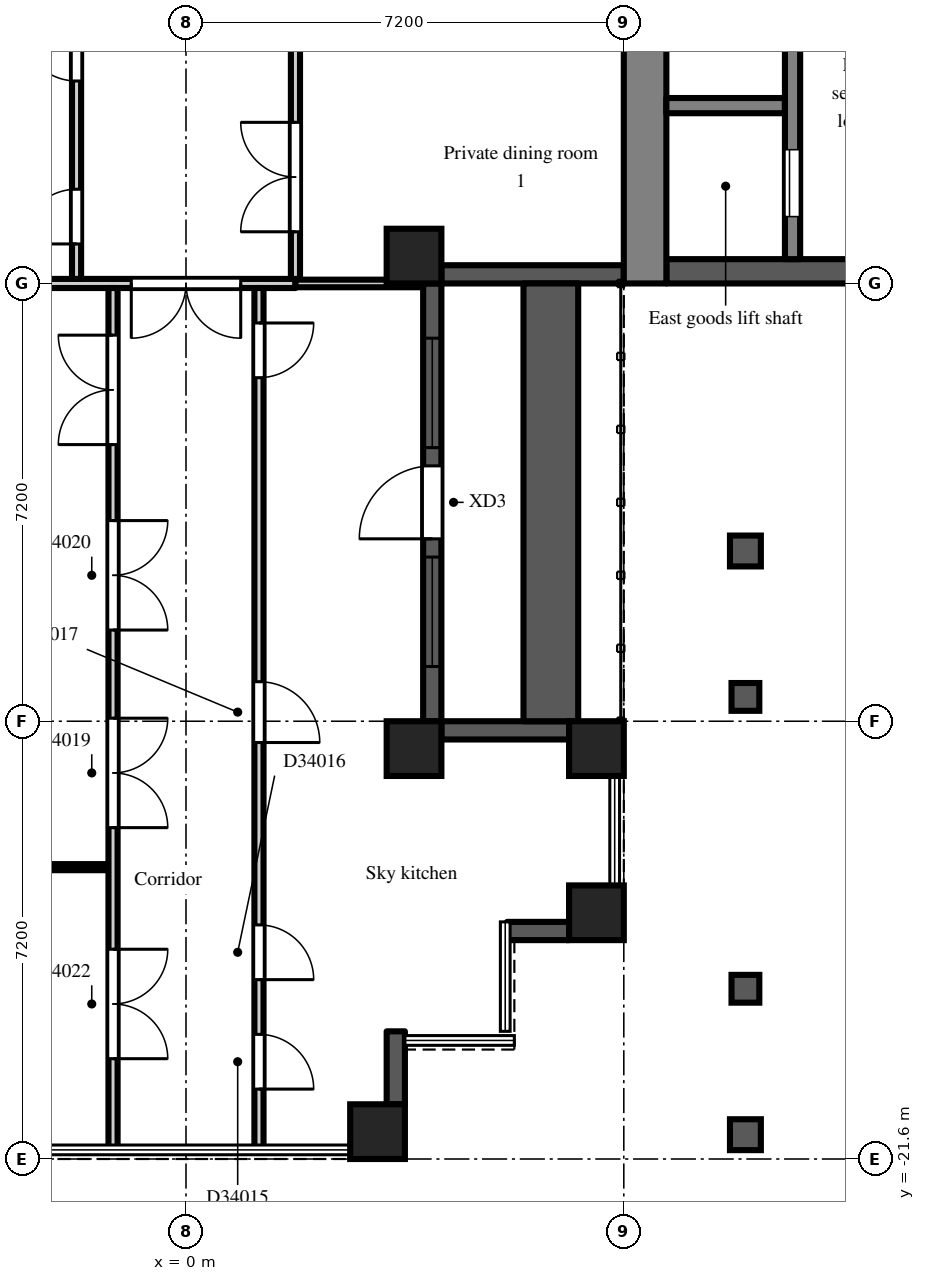
"""IFC4 building model, lengths in metres.
Left out: names, types, materials, properties, quantities, classifications, styles, units other than length and angle.
Written with IfcOpenShell. Run it as: python <this file> out.ifc"""

import sys

from ifc_helpers import new_model, si_unit, direction, frame, frame_2d, origin, origin_2d, place, context, subcontext, project, spatial, rectangle, extrude, element, fill, save


model = new_model("IFC4")
c1 = context("Model", 3, precision=1e-05, world=origin(), true_north=direction((0.0, 1.0)))
c2 = subcontext(c1, "Body", "Model", "MODEL_VIEW")
j1 = project(units=[si_unit("LENGTHUNIT", "METRE"), si_unit("PLANEANGLEUNIT", "RADIAN")], contexts=[c1])
p1 = place(None, origin())
s1 = spatial("IfcSite", under=j1, at=p1, CompositionType="ELEMENT")
p2 = place(p1, origin())
s2 = spatial("IfcBuilding", under=s1, at=p2, CompositionType="ELEMENT")
p3 = place(p2, frame((0.0, 0.0, 237.9)))
s3 = spatial("IfcBuildingStorey", under=s2, at=p3, CompositionType="ELEMENT", Elevation=237.9)
for number, where, z_axis, x_axis in (
    (1, (3.15, -21.15, 0.0), (0.0, 0.0, 1.0), (1.0, 0.0, 0.0)),
    (2, (3.75, -14.85, 0.0), (0.0, 0.0, 1.0), (1.0, 0.0, 0.0)),
    (3, (3.75, -6.75, 0.0), (0.0, 0.0, 1.0), (1.0, 0.0, 0.0)),
    (4, (6.75, -17.55, 0.0), (0.0, 0.0, 1.0), (1.0, 0.0, 0.0)),
    (5, (6.75, -14.85, 0.0), (0.0, 0.0, 1.0), (1.0, 0.0, 0.0)),
):
    element("IfcColumn", number, at=place(p3, frame(where, z_axis=z_axis, x_axis=x_axis)), inside=s3, PredefinedType="COLUMN", context=c2, shape_type="SweptSolid", body=[
        extrude(rectangle(XDim=0.9, YDim=0.9, at=origin_2d()), origin(), (0.0, 0.0, 1.0), 4.2),
    ])
p4 = place(p3, frame((3.45, -20.7, 0.0), z_axis=(0.0, 0.0, 1.0), x_axis=(0.0, 1.0, 0.0)))
e6 = element("IfcWall", 6, at=p4, inside=s3, PredefinedType="SOLIDWALL", context=c2, shape_type="SweptSolid", body=[
    extrude(rectangle(XDim=1.2, YDim=0.3, at=frame_2d((0.6, 0.0))), origin(), (0.0, 0.0, 1.0), 3.75),
])
p5 = place(p3, frame((5.28, -17.85, 0.0), z_axis=(0.0, 0.0, 1.0), x_axis=(1.0, 0.0, 0.0)))
e7 = element("IfcWall", 7, at=p5, inside=s3, PredefinedType="SOLIDWALL", context=c2, shape_type="SweptSolid", body=[
    extrude(rectangle(XDim=1.02, YDim=0.3, at=frame_2d((0.51, 0.0))), origin(), (0.0, 0.0, 1.0), 3.75),
])
p6 = place(p3, frame((6.3, -14.55, 0.0), z_axis=(0.0, 0.0, 1.0), x_axis=(-1.0, 0.0, 0.0)))
e8 = element("IfcWall", 8, at=p6, inside=s3, PredefinedType="SOLIDWALL", context=c2, shape_type="SweptSolid", body=[
    extrude(rectangle(XDim=2.1, YDim=0.3, at=frame_2d((1.05, 0.0))), origin(), (0.0, 0.0, 1.0), 3.75),
])
p7 = place(p3, frame((4.05, -14.4, 0.0), z_axis=(0.0, 0.0, 1.0), x_axis=(0.0, 1.0, 0.0)))
e9 = element("IfcWall", 9, at=p7, inside=s3, PredefinedType="SOLIDWALL", context=c2, shape_type="SweptSolid", body=[
    extrude(rectangle(XDim=7.2, YDim=0.3, at=frame_2d((3.6, 0.0))), origin(), (0.0, 0.0, 1.0), 3.75),
])
p8 = place(p7, frame((3.0, 0.0, 0.0)))
e10 = element("IfcOpeningElement", 10, at=p8, cuts=e9, PredefinedType="OPENING", context=c2, shape_type="SweptSolid", body=[
    extrude(rectangle(XDim=1.2, YDim=2.05, at=frame_2d((0.6, 1.025))), frame((0.0, 0.16, 0.0), z_axis=(0.0, -1.0, 0.0), x_axis=(1.0, 0.0, 0.0)), (0.0, 0.0, 1.0), 0.32),
])
p9 = place(p7, frame((0.9, 0.0, 0.2)))
e11 = element("IfcOpeningElement", 11, at=p9, cuts=e9, PredefinedType="OPENING", context=c2, shape_type="SweptSolid", body=[
    extrude(rectangle(XDim=1.8, YDim=1.85, at=frame_2d((0.9, 0.925))), frame((0.0, 0.16, 0.0), z_axis=(0.0, -1.0, 0.0), x_axis=(1.0, 0.0, 0.0)), (0.0, 0.0, 1.0), 0.32),
])
p10 = place(p7, frame((4.5, 0.0, 0.2)))
e12 = element("IfcOpeningElement", 12, at=p10, cuts=e9, PredefinedType="OPENING", context=c2, shape_type="SweptSolid", body=[
    extrude(rectangle(XDim=1.8, YDim=1.85, at=frame_2d((0.9, 0.925))), frame((0.0, 0.16, 0.0), z_axis=(0.0, -1.0, 0.0), x_axis=(1.0, 0.0, 0.0)), (0.0, 0.0, 1.0), 0.32),
])
p11 = place(p3, frame((4.2, -7.05, 0.0), z_axis=(0.0, 0.0, 1.0), x_axis=(1.0, 0.0, 0.0)))
e13 = element("IfcWall", 13, at=p11, inside=s3, PredefinedType="SOLIDWALL", context=c2, shape_type="SweptSolid", body=[
    extrude(rectangle(XDim=3.0, YDim=0.3, at=frame_2d((1.5, 0.0))), origin(), (0.0, 0.0, 1.0), 3.75),
])
p12 = place(p3, frame((6.0, -14.4, 0.0), z_axis=(0.0, 0.0, 1.0), x_axis=(0.0, 1.0, 0.0)))
e14 = element("IfcWall", 14, at=p12, inside=s3, PredefinedType="PARAPET", context=c2, shape_type="SweptSolid", body=[
    extrude(rectangle(XDim=7.2, YDim=0.9, at=frame_2d((3.6, 0.0))), origin(), (0.0, 0.0, 1.0), 0.8),
])
p13 = place(p3, frame((7.55, -7.2, 0.0), z_axis=(0.0, 0.0, 1.0), x_axis=(0.0, 1.0, 0.0)))
e15 = element("IfcWall", 15, at=p13, inside=s3, PredefinedType="SHEAR", context=c2, shape_type="SweptSolid", body=[
    extrude(rectangle(XDim=14.4, YDim=0.7, at=frame_2d((7.2, 0.0))), origin(), (0.0, 0.0, 1.0), 3.75),
])
p14 = place(p13, frame((6.0, 0.0, 0.0)))
e16 = element("IfcOpeningElement", 16, at=p14, cuts=e15, PredefinedType="OPENING", context=c2, shape_type="SweptSolid", body=[
    extrude(rectangle(XDim=2.4, YDim=2.2, at=frame_2d((1.2, 1.1))), frame((0.0, 0.36, 0.0), z_axis=(0.0, -1.0, 0.0), x_axis=(1.0, 0.0, 0.0)), (0.0, 0.0, 1.0), 0.72),
])
p15 = place(p3, frame((7.9, -7.0, 0.0), z_axis=(0.0, 0.0, 1.0), x_axis=(1.0, 0.0, 0.0)))
e17 = element("IfcWall", 17, at=p15, inside=s3, PredefinedType="SHEAR", context=c2, shape_type="SweptSolid", body=[
    extrude(rectangle(XDim=12.95, YDim=0.4, at=frame_2d((6.475, 0.0))), origin(), (0.0, 0.0, 1.0), 3.75),
])
p16 = place(p3, frame((7.9, -4.275, 0.0), z_axis=(0.0, 0.0, 1.0), x_axis=(1.0, 0.0, 0.0)))
e18 = element("IfcWall", 18, at=p16, inside=s3, PredefinedType="SHEAR", context=c2, shape_type="SweptSolid", body=[
    extrude(rectangle(XDim=1.95, YDim=0.25, at=frame_2d((0.975, 0.0))), origin(), (0.0, 0.0, 1.0), 3.75),
])
p17 = place(p3, frame((9.975, -2.05, 0.0), z_axis=(0.0, 0.0, 1.0), x_axis=(0.0, -1.0, 0.0)))
e19 = element("IfcWall", 19, at=p17, inside=s3, PredefinedType="SHEAR", context=c2, shape_type="SweptSolid", body=[
    extrude(rectangle(XDim=4.75, YDim=0.25, at=frame_2d((2.375, 0.0))), origin(), (0.0, 0.0, 1.0), 3.75),
])
p18 = place(p17, frame((2.95, 0.0, 0.0)))
e20 = element("IfcOpeningElement", 20, at=p18, cuts=e19, PredefinedType="OPENING", context=c2, shape_type="SweptSolid", body=[
    extrude(rectangle(XDim=1.1, YDim=2.1, at=frame_2d((0.55, 1.05))), frame((0.0, 0.135, 0.0), z_axis=(0.0, -1.0, 0.0), x_axis=(1.0, 0.0, 0.0)), (0.0, 0.0, 1.0), 0.27),
])
p19 = place(p3, frame((-7.02, -16.8, 0.0), z_axis=(0.0, 0.0, 1.0), x_axis=(1.0, 0.0, 0.0)))
e21 = element("IfcWall", 21, at=p19, inside=s3, PredefinedType="PARTITIONING", context=c2, shape_type="SweptSolid", body=[
    extrude(rectangle(XDim=5.745, YDim=0.1, at=frame_2d((2.873, 0.0))), origin(), (0.0, 0.0, 1.0), 3.75),
])
p20 = place(p3, frame((-3.9, -7.2, 0.0), z_axis=(0.0, 0.0, 1.0), x_axis=(1.0, 0.0, 0.0)))
e22 = element("IfcWall", 22, at=p20, inside=s3, PredefinedType="PARTITIONING", context=c2, shape_type="SweptSolid", body=[
    extrude(rectangle(XDim=5.7, YDim=0.15, at=frame_2d((2.85, 0.0))), origin(), (0.0, 0.0, 1.0), 3.75),
])
p21 = place(p20, frame((3.0, 0.0, 0.0)))
e23 = element("IfcOpeningElement", 23, at=p21, cuts=e22, PredefinedType="OPENING", context=c2, shape_type="SweptSolid", body=[
    extrude(rectangle(XDim=1.8, YDim=2.1, at=frame_2d((0.9, 1.05))), frame((0.0, 0.085, 0.0), z_axis=(0.0, -1.0, 0.0), x_axis=(1.0, 0.0, 0.0)), (0.0, 0.0, 1.0), 0.17),
])
p22 = place(p3, frame((-1.8, -7.125, 0.0), z_axis=(0.0, 0.0, 1.0), x_axis=(0.0, 1.0, 0.0)))
e24 = element("IfcWall", 24, at=p22, inside=s3, PredefinedType="PARTITIONING", context=c2, shape_type="SweptSolid", body=[
    extrude(rectangle(XDim=5.4, YDim=0.15, at=frame_2d((2.7, 0.0))), origin(), (0.0, 0.0, 1.0), 3.75),
])
p23 = place(p22, frame((0.575, 0.0, 0.0)))
e25 = element("IfcOpeningElement", 25, at=p23, cuts=e24, PredefinedType="OPENING", context=c2, shape_type="SweptSolid", body=[
    extrude(rectangle(XDim=0.9, YDim=2.1, at=frame_2d((0.45, 1.05))), frame((0.0, 0.085, 0.0), z_axis=(0.0, -1.0, 0.0), x_axis=(1.0, 0.0, 0.0)), (0.0, 0.0, 1.0), 0.17),
])
p24 = place(p22, frame((3.255, 0.0, 0.0)))
e26 = element("IfcOpeningElement", 26, at=p24, cuts=e24, PredefinedType="OPENING", context=c2, shape_type="SweptSolid", body=[
    extrude(rectangle(XDim=0.9, YDim=2.1, at=frame_2d((0.45, 1.05))), frame((0.0, 0.085, 0.0), z_axis=(0.0, -1.0, 0.0), x_axis=(1.0, 0.0, 0.0)), (0.0, 0.0, 1.0), 0.17),
])
p25 = place(p3, frame((-1.2, -21.42, 0.0), z_axis=(0.0, 0.0, 1.0), x_axis=(0.0, 1.0, 0.0)))
e27 = element("IfcWall", 27, at=p25, inside=s3, PredefinedType="PARTITIONING", context=c2, shape_type="SweptSolid", body=[
    extrude(rectangle(XDim=14.145, YDim=0.15, at=frame_2d((7.073, 0.0))), origin(), (0.0, 0.0, 1.0), 3.75),
])
p26 = place(p25, frame((5.27, 0.0, 0.0)))
e28 = element("IfcOpeningElement", 28, at=p26, cuts=e27, PredefinedType="OPENING", context=c2, shape_type="SweptSolid", body=[
    extrude(rectangle(XDim=1.8, YDim=2.1, at=frame_2d((0.9, 1.05))), frame((0.0, 0.085, 0.0), z_axis=(0.0, -1.0, 0.0), x_axis=(1.0, 0.0, 0.0)), (0.0, 0.0, 1.0), 0.17),
])
p27 = place(p25, frame((8.52, 0.0, 0.0)))
e29 = element("IfcOpeningElement", 29, at=p27, cuts=e27, PredefinedType="OPENING", context=c2, shape_type="SweptSolid", body=[
    extrude(rectangle(XDim=1.8, YDim=2.1, at=frame_2d((0.9, 1.05))), frame((0.0, 0.085, 0.0), z_axis=(0.0, -1.0, 0.0), x_axis=(1.0, 0.0, 0.0)), (0.0, 0.0, 1.0), 0.17),
])
p28 = place(p25, frame((11.57, 0.0, 0.0)))
e30 = element("IfcOpeningElement", 30, at=p28, cuts=e27, PredefinedType="OPENING", context=c2, shape_type="SweptSolid", body=[
    extrude(rectangle(XDim=1.8, YDim=2.1, at=frame_2d((0.9, 1.05))), frame((0.0, 0.085, 0.0), z_axis=(0.0, -1.0, 0.0), x_axis=(1.0, 0.0, 0.0)), (0.0, 0.0, 1.0), 0.17),
])
p29 = place(p25, frame((1.47, 0.0, 0.0)))
e31 = element("IfcOpeningElement", 31, at=p29, cuts=e27, PredefinedType="OPENING", context=c2, shape_type="SweptSolid", body=[
    extrude(rectangle(XDim=1.8, YDim=2.1, at=frame_2d((0.9, 1.05))), frame((0.0, 0.085, 0.0), z_axis=(0.0, -1.0, 0.0), x_axis=(1.0, 0.0, 0.0)), (0.0, 0.0, 1.0), 0.17),
])
p30 = place(p3, frame((1.2, -21.42, 0.0), z_axis=(0.0, 0.0, 1.0), x_axis=(0.0, 1.0, 0.0)))
e32 = element("IfcWall", 32, at=p30, inside=s3, PredefinedType="PARTITIONING", context=c2, shape_type="SweptSolid", body=[
    extrude(rectangle(XDim=14.145, YDim=0.15, at=frame_2d((7.073, 0.0))), origin(), (0.0, 0.0, 1.0), 3.75),
])
p31 = place(p30, frame((0.97, 0.0, 0.0)))
e33 = element("IfcOpeningElement", 33, at=p31, cuts=e32, PredefinedType="OPENING", context=c2, shape_type="SweptSolid", body=[
    extrude(rectangle(XDim=0.9, YDim=2.1, at=frame_2d((0.45, 1.05))), frame((0.0, 0.085, 0.0), z_axis=(0.0, -1.0, 0.0), x_axis=(1.0, 0.0, 0.0)), (0.0, 0.0, 1.0), 0.17),
])
p32 = place(p30, frame((2.77, 0.0, 0.0)))
e34 = element("IfcOpeningElement", 34, at=p32, cuts=e32, PredefinedType="OPENING", context=c2, shape_type="SweptSolid", body=[
    extrude(rectangle(XDim=0.9, YDim=2.1, at=frame_2d((0.45, 1.05))), frame((0.0, 0.085, 0.0), z_axis=(0.0, -1.0, 0.0), x_axis=(1.0, 0.0, 0.0)), (0.0, 0.0, 1.0), 0.17),
])
p33 = place(p30, frame((6.67, 0.0, 0.0)))
e35 = element("IfcOpeningElement", 35, at=p33, cuts=e32, PredefinedType="OPENING", context=c2, shape_type="SweptSolid", body=[
    extrude(rectangle(XDim=1.0, YDim=2.1, at=frame_2d((0.5, 1.05))), frame((0.0, 0.085, 0.0), z_axis=(0.0, -1.0, 0.0), x_axis=(1.0, 0.0, 0.0)), (0.0, 0.0, 1.0), 0.17),
])
p34 = place(p30, frame((12.67, 0.0, 0.0)))
e36 = element("IfcOpeningElement", 36, at=p34, cuts=e32, PredefinedType="OPENING", context=c2, shape_type="SweptSolid", body=[
    extrude(rectangle(XDim=0.9, YDim=2.1, at=frame_2d((0.45, 1.05))), frame((0.0, 0.085, 0.0), z_axis=(0.0, -1.0, 0.0), x_axis=(1.0, 0.0, 0.0)), (0.0, 0.0, 1.0), 0.17),
])
p35 = place(p3, frame((1.8, -7.125, 0.0), z_axis=(0.0, 0.0, 1.0), x_axis=(0.0, 1.0, 0.0)))
e37 = element("IfcWall", 37, at=p35, inside=s3, PredefinedType="PARTITIONING", context=c2, shape_type="SweptSolid", body=[
    extrude(rectangle(XDim=5.4, YDim=0.15, at=frame_2d((2.7, 0.0))), origin(), (0.0, 0.0, 1.0), 3.75),
])
p36 = place(p35, frame((0.775, 0.0, 0.0)))
e38 = element("IfcOpeningElement", 38, at=p36, cuts=e37, PredefinedType="OPENING", context=c2, shape_type="SweptSolid", body=[
    extrude(rectangle(XDim=1.8, YDim=2.1, at=frame_2d((0.9, 1.05))), frame((0.0, 0.085, 0.0), z_axis=(0.0, -1.0, 0.0), x_axis=(1.0, 0.0, 0.0)), (0.0, 0.0, 1.0), 0.17),
])
p37 = place(p3, frame((1.8, -7.2, 0.0), z_axis=(0.0, 0.0, 1.0), x_axis=(1.0, 0.0, 0.0)))
e39 = element("IfcWall", 39, at=p37, inside=s3, PredefinedType="PARTITIONING", context=c2, shape_type="SweptSolid", body=[
    extrude(rectangle(XDim=2.1, YDim=0.125, at=frame_2d((1.05, 0.0))), origin(), (0.0, 0.0, 1.0), 3.75),
])
p38 = place(p8, origin())
e40 = element("IfcDoor", 40, at=p38, inside=s3, OperationType="SINGLE_SWING_LEFT", PredefinedType="DOOR", context=c2, shape_type="SweptSolid", body=[
    extrude(rectangle(XDim=1.2, YDim=2.05, at=frame_2d((0.6, 1.025))), frame((0.0, 0.025, 0.0), z_axis=(0.0, -1.0, 0.0), x_axis=(1.0, 0.0, 0.0)), (0.0, 0.0, 1.0), 0.05),
])
fill(e10, e40)
p39 = place(p9, origin())
e41 = element("IfcWindow", 41, at=p39, inside=s3, PartitioningType="SINGLE_PANEL", PredefinedType="WINDOW", context=c2, shape_type="SweptSolid", body=[
    extrude(rectangle(XDim=1.8, YDim=1.85, at=frame_2d((0.9, 0.925))), frame((0.0, 0.03, 0.0), z_axis=(0.0, -1.0, 0.0), x_axis=(1.0, 0.0, 0.0)), (0.0, 0.0, 1.0), 0.06),
])
fill(e11, e41)
p40 = place(p10, origin())
e42 = element("IfcWindow", 42, at=p40, inside=s3, PartitioningType="SINGLE_PANEL", PredefinedType="WINDOW", context=c2, shape_type="SweptSolid", body=[
    extrude(rectangle(XDim=1.8, YDim=1.85, at=frame_2d((0.9, 0.925))), frame((0.0, 0.03, 0.0), z_axis=(0.0, -1.0, 0.0), x_axis=(1.0, 0.0, 0.0)), (0.0, 0.0, 1.0), 0.06),
])
fill(e12, e42)
p41 = place(p18, origin())
e43 = element("IfcDoor", 43, at=p41, inside=s3, OperationType="SLIDING_TO_LEFT", PredefinedType="DOOR", context=c2, shape_type="SweptSolid", body=[
    extrude(rectangle(XDim=1.1, YDim=2.1, at=frame_2d((0.55, 1.05))), frame((0.0, 0.025, 0.0), z_axis=(0.0, -1.0, 0.0), x_axis=(1.0, 0.0, 0.0)), (0.0, 0.0, 1.0), 0.05),
])
fill(e20, e43)
p42 = place(p23, origin())
e44 = element("IfcDoor", 44, at=p42, inside=s3, OperationType="SINGLE_SWING_LEFT", PredefinedType="DOOR", context=c2, shape_type="SweptSolid", body=[
    extrude(rectangle(XDim=0.9, YDim=2.1, at=frame_2d((0.45, 1.05))), frame((0.0, 0.025, 0.0), z_axis=(0.0, -1.0, 0.0), x_axis=(1.0, 0.0, 0.0)), (0.0, 0.0, 1.0), 0.05),
])
fill(e25, e44)
p43 = place(p24, origin())
e45 = element("IfcDoor", 45, at=p43, inside=s3, OperationType="SINGLE_SWING_RIGHT", PredefinedType="DOOR", context=c2, shape_type="SweptSolid", body=[
    extrude(rectangle(XDim=0.9, YDim=2.1, at=frame_2d((0.45, 1.05))), frame((0.0, 0.025, 0.0), z_axis=(0.0, -1.0, 0.0), x_axis=(1.0, 0.0, 0.0)), (0.0, 0.0, 1.0), 0.05),
])
fill(e26, e45)
p44 = place(p36, origin())
e46 = element("IfcDoor", 46, at=p44, inside=s3, OperationType="DOUBLE_DOOR_DOUBLE_SWING", PredefinedType="DOOR", context=c2, shape_type="SweptSolid", body=[
    extrude(rectangle(XDim=1.8, YDim=2.1, at=frame_2d((0.9, 1.05))), frame((0.0, 0.025, 0.0), z_axis=(0.0, -1.0, 0.0), x_axis=(1.0, 0.0, 0.0)), (0.0, 0.0, 1.0), 0.05),
])
fill(e38, e46)
p45 = place(p21, frame((1.8, 0.0, 0.0), z_axis=(0.0, 0.0, 1.0), x_axis=(-1.0, 0.0, 0.0)))
e47 = element("IfcDoor", 47, at=p45, inside=s3, OperationType="DOUBLE_DOOR_DOUBLE_SWING", PredefinedType="DOOR", context=c2, shape_type="SweptSolid", body=[
    extrude(rectangle(XDim=1.8, YDim=2.1, at=frame_2d((0.9, 1.05))), frame((0.0, 0.025, 0.0), z_axis=(0.0, -1.0, 0.0), x_axis=(1.0, 0.0, 0.0)), (0.0, 0.0, 1.0), 0.05),
])
fill(e23, e47)
p46 = place(p31, frame((0.9, 0.0, 0.0), z_axis=(0.0, 0.0, 1.0), x_axis=(-1.0, 0.0, 0.0)))
e48 = element("IfcDoor", 48, at=p46, inside=s3, OperationType="SINGLE_SWING_RIGHT", PredefinedType="DOOR", context=c2, shape_type="SweptSolid", body=[
    extrude(rectangle(XDim=0.9, YDim=2.1, at=frame_2d((0.45, 1.05))), frame((0.0, 0.025, 0.0), z_axis=(0.0, -1.0, 0.0), x_axis=(1.0, 0.0, 0.0)), (0.0, 0.0, 1.0), 0.05),
])
fill(e33, e48)
p47 = place(p32, frame((0.9, 0.0, 0.0), z_axis=(0.0, 0.0, 1.0), x_axis=(-1.0, 0.0, 0.0)))
e49 = element("IfcDoor", 49, at=p47, inside=s3, OperationType="SINGLE_SWING_RIGHT", PredefinedType="DOOR", context=c2, shape_type="SweptSolid", body=[
    extrude(rectangle(XDim=0.9, YDim=2.1, at=frame_2d((0.45, 1.05))), frame((0.0, 0.025, 0.0), z_axis=(0.0, -1.0, 0.0), x_axis=(1.0, 0.0, 0.0)), (0.0, 0.0, 1.0), 0.05),
])
fill(e34, e49)
p48 = place(p33, frame((1.0, 0.0, 0.0), z_axis=(0.0, 0.0, 1.0), x_axis=(-1.0, 0.0, 0.0)))
e50 = element("IfcDoor", 50, at=p48, inside=s3, OperationType="SINGLE_SWING_RIGHT", PredefinedType="DOOR", context=c2, shape_type="SweptSolid", body=[
    extrude(rectangle(XDim=1.0, YDim=2.1, at=frame_2d((0.5, 1.05))), frame((0.0, 0.025, 0.0), z_axis=(0.0, -1.0, 0.0), x_axis=(1.0, 0.0, 0.0)), (0.0, 0.0, 1.0), 0.05),
])
fill(e35, e50)
p49 = place(p34, frame((0.9, 0.0, 0.0), z_axis=(0.0, 0.0, 1.0), x_axis=(-1.0, 0.0, 0.0)))
e51 = element("IfcDoor", 51, at=p49, inside=s3, OperationType="SINGLE_SWING_LEFT", PredefinedType="DOOR", context=c2, shape_type="SweptSolid", body=[
    extrude(rectangle(XDim=0.9, YDim=2.1, at=frame_2d((0.45, 1.05))), frame((0.0, 0.025, 0.0), z_axis=(0.0, -1.0, 0.0), x_axis=(1.0, 0.0, 0.0)), (0.0, 0.0, 1.0), 0.05),
])
fill(e36, e51)
p50 = place(p26, frame((1.8, 0.0, 0.0), z_axis=(0.0, 0.0, 1.0), x_axis=(-1.0, 0.0, 0.0)))
e52 = element("IfcDoor", 52, at=p50, inside=s3, OperationType="DOUBLE_DOOR_DOUBLE_SWING", PredefinedType="DOOR", context=c2, shape_type="SweptSolid", body=[
    extrude(rectangle(XDim=1.8, YDim=2.1, at=frame_2d((0.9, 1.05))), frame((0.0, 0.025, 0.0), z_axis=(0.0, -1.0, 0.0), x_axis=(1.0, 0.0, 0.0)), (0.0, 0.0, 1.0), 0.05),
])
fill(e28, e52)
p51 = place(p27, frame((1.8, 0.0, 0.0), z_axis=(0.0, 0.0, 1.0), x_axis=(-1.0, 0.0, 0.0)))
e53 = element("IfcDoor", 53, at=p51, inside=s3, OperationType="DOUBLE_DOOR_DOUBLE_SWING", PredefinedType="DOOR", context=c2, shape_type="SweptSolid", body=[
    extrude(rectangle(XDim=1.8, YDim=2.1, at=frame_2d((0.9, 1.05))), frame((0.0, 0.025, 0.0), z_axis=(0.0, -1.0, 0.0), x_axis=(1.0, 0.0, 0.0)), (0.0, 0.0, 1.0), 0.05),
])
fill(e29, e53)
p52 = place(p28, origin())
e54 = element("IfcDoor", 54, at=p52, inside=s3, OperationType="DOUBLE_DOOR_DOUBLE_SWING", PredefinedType="DOOR", context=c2, shape_type="SweptSolid", body=[
    extrude(rectangle(XDim=1.8, YDim=2.1, at=frame_2d((0.9, 1.05))), frame((0.0, 0.025, 0.0), z_axis=(0.0, -1.0, 0.0), x_axis=(1.0, 0.0, 0.0)), (0.0, 0.0, 1.0), 0.05),
])
fill(e30, e54)
p53 = place(p29, frame((1.8, 0.0, 0.0), z_axis=(0.0, 0.0, 1.0), x_axis=(-1.0, 0.0, 0.0)))
e55 = element("IfcDoor", 55, at=p53, inside=s3, OperationType="DOUBLE_DOOR_DOUBLE_SWING", PredefinedType="DOOR", context=c2, shape_type="SweptSolid", body=[
    extrude(rectangle(XDim=1.8, YDim=2.1, at=frame_2d((0.9, 1.05))), frame((0.0, 0.025, 0.0), z_axis=(0.0, -1.0, 0.0), x_axis=(1.0, 0.0, 0.0)), (0.0, 0.0, 1.0), 0.05),
])
fill(e31, e55)
save(model, sys.argv[1])
